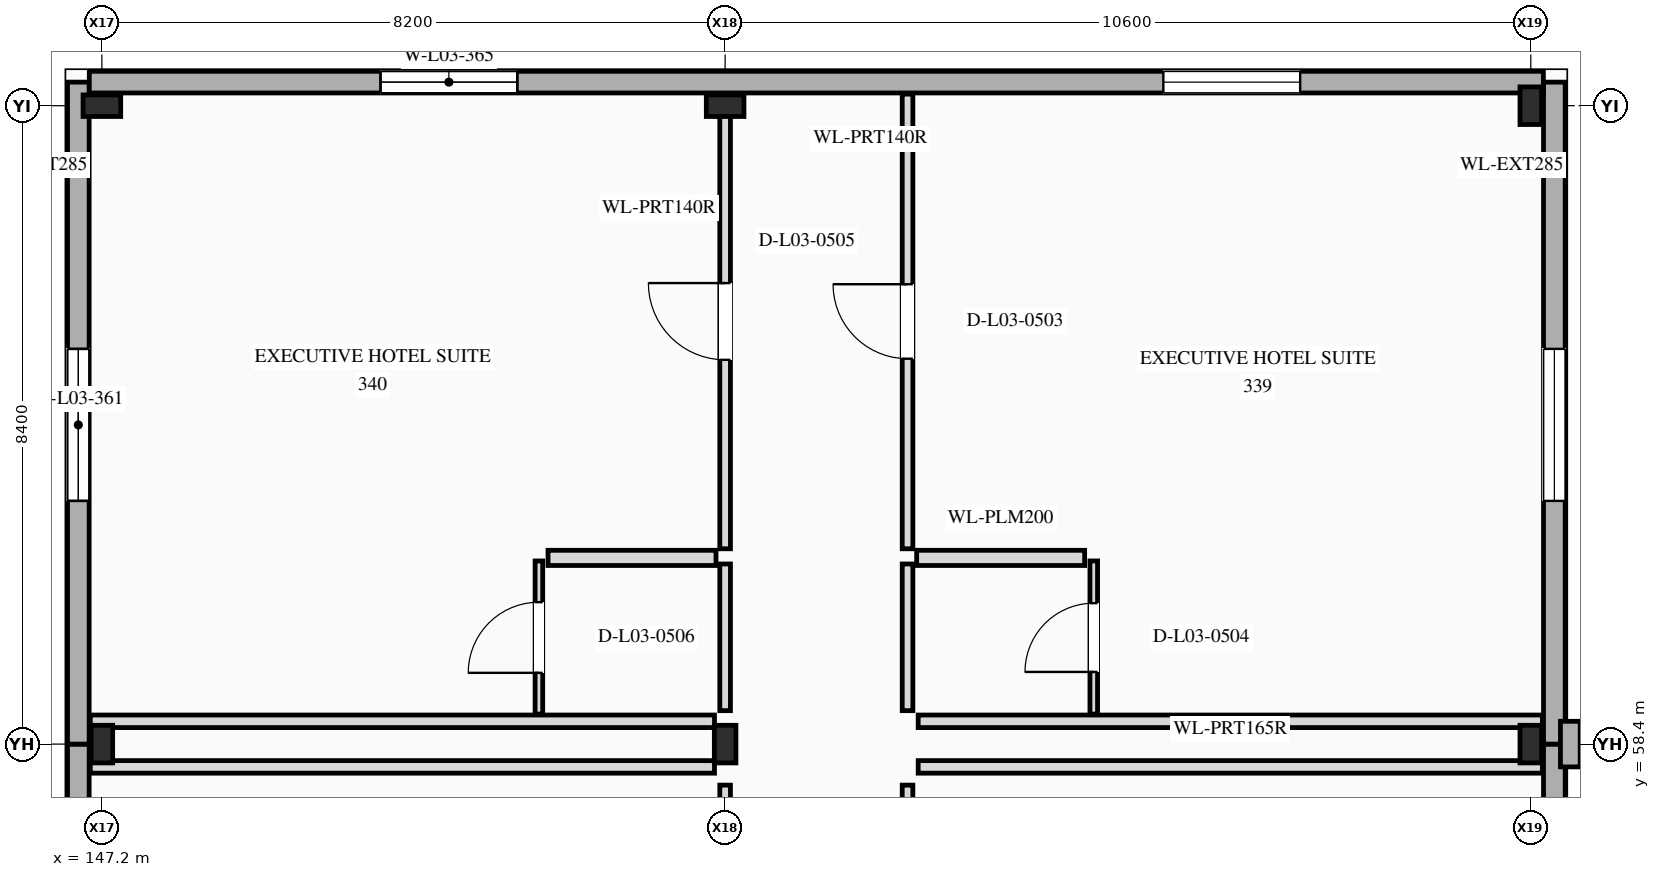
"""IFC4 building model, lengths in metres.
Left out: names, types, materials, properties, quantities, classifications, styles, units other than length and angle.
Written with IfcOpenShell. Run it as: python <this file> out.ifc"""

import sys

from ifc_helpers import new_model, si_unit, direction, frame, frame_2d, origin, origin_2d, place, context, subcontext, project, spatial, rectangle, i_section, extrude, element, fill, save


model = new_model("IFC4")
c1 = context("Model", 3, precision=1e-05, world=origin(), true_north=direction((0.0, 1.0)))
c2 = subcontext(c1, "Body", "Model", "MODEL_VIEW")
j1 = project(units=[si_unit("LENGTHUNIT", "METRE"), si_unit("PLANEANGLEUNIT", "RADIAN")], contexts=[c1])
p1 = place(None, origin())
s1 = spatial("IfcSite", under=j1, at=p1, CompositionType="ELEMENT")
p2 = place(p1, origin())
s2 = spatial("IfcBuilding", under=s1, at=p2, CompositionType="ELEMENT")
p3 = place(p2, frame((0.0, 0.0, 15.6)))
s3 = spatial("IfcBuildingStorey", under=s2, at=p3, CompositionType="ELEMENT", Elevation=15.6)
for number, where, z_axis, x_axis in (
    (1, (147.2, 58.4, 0.0), (0.0, 0.0, 1.0), (1.0, 0.0, 0.0)),
    (2, (147.2, 66.8, 0.0), (0.0, 0.0, 1.0), (0.0, 1.0, 0.0)),
    (3, (155.4, 58.4, 0.0), (0.0, 0.0, 1.0), (1.0, 0.0, 0.0)),
    (4, (155.4, 66.8, 0.0), (0.0, 0.0, 1.0), (0.0, 1.0, 0.0)),
    (5, (166.0, 58.4, 0.0), (0.0, 0.0, 1.0), (1.0, 0.0, 0.0)),
    (6, (166.0, 66.8, 0.0), (0.0, 0.0, 1.0), (1.0, 0.0, 0.0)),
):
    element("IfcColumn", number, at=place(p3, frame(where, z_axis=z_axis, x_axis=x_axis)), inside=s3, PredefinedType="COLUMN", context=c2, shape_type="SweptSolid", body=[
        extrude(i_section(OverallWidth=0.284, OverallDepth=0.495, WebThickness=0.019, FlangeThickness=0.033, at=origin_2d()), origin(), (0.0, 0.0, 1.0), 3.9),
    ])
p4 = place(p3, frame((166.31, 50.0, 0.0), z_axis=(0.0, 0.0, 1.0), x_axis=(0.0, 1.0, 0.0)))
e7 = element("IfcWall", 7, at=p4, inside=s3, PredefinedType="STANDARD", context=c2, shape_type="SweptSolid", body=[
    extrude(rectangle(XDim=8.4, YDim=0.285, at=frame_2d((4.2, 0.0))), origin(), (0.0, 0.0, 1.0), 3.9),
])
p5 = place(p4, frame((3.2, 0.0, 0.85)))
e8 = element("IfcOpeningElement", 8, at=p5, cuts=e7, PredefinedType="OPENING", context=c2, shape_type="SweptSolid", body=[
    extrude(rectangle(XDim=2.0, YDim=1.65, at=frame_2d((1.0, 0.825))), frame((0.0, 0.152, 0.0), z_axis=(0.0, -1.0, 0.0), x_axis=(1.0, 0.0, 0.0)), (0.0, 0.0, 1.0), 0.305),
])
p6 = place(p3, frame((166.31, 58.4, 0.0), z_axis=(0.0, 0.0, 1.0), x_axis=(0.0, 1.0, 0.0)))
e9 = element("IfcWall", 9, at=p6, inside=s3, PredefinedType="STANDARD", context=c2, shape_type="SweptSolid", body=[
    extrude(rectangle(XDim=8.71, YDim=0.285, at=frame_2d((4.355, 0.0))), origin(), (0.0, 0.0, 1.0), 3.9),
])
p7 = place(p6, frame((3.2, 0.0, 0.85)))
e10 = element("IfcOpeningElement", 10, at=p7, cuts=e9, PredefinedType="OPENING", context=c2, shape_type="SweptSolid", body=[
    extrude(rectangle(XDim=2.0, YDim=1.65, at=frame_2d((1.0, 0.825))), frame((0.0, 0.152, 0.0), z_axis=(0.0, -1.0, 0.0), x_axis=(1.0, 0.0, 0.0)), (0.0, 0.0, 1.0), 0.305),
])
p8 = place(p3, frame((166.52, 58.1, 0.0), z_axis=(0.0, 0.0, 1.0), x_axis=(0.0, 1.0, 0.0)))
e11 = element("IfcWall", 11, at=p8, inside=s3, PredefinedType="ELEMENTEDWALL", context=c2, shape_type="SweptSolid", body=[
    extrude(rectangle(XDim=0.6, YDim=0.26, at=frame_2d((0.3, 0.0))), origin(), (0.0, 0.0, 1.0), 3.9),
])
p9 = place(p3, frame((146.89, 50.0, 0.0), z_axis=(0.0, 0.0, 1.0), x_axis=(0.0, 1.0, 0.0)))
e12 = element("IfcWall", 12, at=p9, inside=s3, PredefinedType="STANDARD", context=c2, shape_type="SweptSolid", body=[
    extrude(rectangle(XDim=8.4, YDim=0.285, at=frame_2d((4.2, 0.0))), origin(), (0.0, 0.0, 1.0), 3.9),
])
p10 = place(p9, frame((3.225, 0.0, 0.85)))
e13 = element("IfcOpeningElement", 13, at=p10, cuts=e12, PredefinedType="OPENING", context=c2, shape_type="SweptSolid", body=[
    extrude(rectangle(XDim=1.95, YDim=1.85, at=frame_2d((0.975, 0.925))), frame((0.0, 0.152, 0.0), z_axis=(0.0, -1.0, 0.0), x_axis=(1.0, 0.0, 0.0)), (0.0, 0.0, 1.0), 0.305),
])
p11 = place(p3, frame((146.89, 58.4, 0.0), z_axis=(0.0, 0.0, 1.0), x_axis=(0.0, 1.0, 0.0)))
e14 = element("IfcWall", 14, at=p11, inside=s3, PredefinedType="STANDARD", context=c2, shape_type="SweptSolid", body=[
    extrude(rectangle(XDim=8.71, YDim=0.285, at=frame_2d((4.355, 0.0))), origin(), (0.0, 0.0, 1.0), 3.9),
])
p12 = place(p11, frame((3.2, 0.0, 0.85)))
e15 = element("IfcOpeningElement", 15, at=p12, cuts=e14, PredefinedType="OPENING", context=c2, shape_type="SweptSolid", body=[
    extrude(rectangle(XDim=2.0, YDim=1.65, at=frame_2d((1.0, 0.825))), frame((0.0, 0.152, 0.0), z_axis=(0.0, -1.0, 0.0), x_axis=(1.0, 0.0, 0.0)), (0.0, 0.0, 1.0), 0.305),
])
p13 = place(p3, frame((166.166, 67.11, 0.0), z_axis=(0.0, 0.0, 1.0), x_axis=(-1.0, 0.0, 0.0)))
e16 = element("IfcWall", 16, at=p13, inside=s3, PredefinedType="STANDARD", context=c2, shape_type="SweptSolid", body=[
    extrude(rectangle(XDim=19.131, YDim=0.285, at=frame_2d((9.565, 0.0))), origin(), (0.0, 0.0, 1.0), 3.9),
])
p14 = place(p13, frame((3.2, 0.0, 0.88)))
e17 = element("IfcOpeningElement", 17, at=p14, cuts=e16, PredefinedType="OPENING", context=c2, shape_type="SweptSolid", body=[
    extrude(rectangle(XDim=1.8, YDim=1.8, at=frame_2d((0.9, 0.9))), frame((0.0, 0.152, 0.0), z_axis=(0.0, -1.0, 0.0), x_axis=(1.0, 0.0, 0.0)), (0.0, 0.0, 1.0), 0.305),
])
p15 = place(p13, frame((13.5, 0.0, 0.88)))
e18 = element("IfcOpeningElement", 18, at=p15, cuts=e16, PredefinedType="OPENING", context=c2, shape_type="SweptSolid", body=[
    extrude(rectangle(XDim=1.8, YDim=1.8, at=frame_2d((0.9, 0.9))), frame((0.0, 0.152, 0.0), z_axis=(0.0, -1.0, 0.0), x_axis=(1.0, 0.0, 0.0)), (0.0, 0.0, 1.0), 0.305),
])
p16 = place(p3, frame((157.8, 52.57, 0.0), z_axis=(0.0, 0.0, 1.0), x_axis=(0.0, 1.0, 0.0)))
e19 = element("IfcWall", 19, at=p16, inside=s3, PredefinedType="PARTITIONING", context=c2, shape_type="SweptSolid", body=[
    extrude(rectangle(XDim=5.29, YDim=0.14, at=frame_2d((2.645, 0.0))), origin(), (0.0, 0.0, 1.0), 3.153),
])
p17 = place(p16, frame((2.185, 0.0, 0.0)))
e20 = element("IfcOpeningElement", 20, at=p17, cuts=e19, PredefinedType="OPENING", context=c2, shape_type="SweptSolid", body=[
    extrude(rectangle(XDim=0.92, YDim=2.3, at=frame_2d((0.46, 1.15))), frame((0.0, 0.08, 0.0), z_axis=(0.0, -1.0, 0.0), x_axis=(1.0, 0.0, 0.0)), (0.0, 0.0, 1.0), 0.16),
])
p18 = place(p3, frame((157.94, 58.1, 0.0), z_axis=(0.0, 0.0, 1.0), x_axis=(1.0, 0.0, 0.0)))
e21 = element("IfcWall", 21, at=p18, inside=s3, PredefinedType="PARTITIONING", context=c2, shape_type="SweptSolid", body=[
    extrude(rectangle(XDim=8.213, YDim=0.165, at=frame_2d((4.106, 0.0))), origin(), (0.0, 0.0, 1.0), 2.99),
])
p19 = place(p3, frame((155.4, 52.57, 0.0), z_axis=(0.0, 0.0, 1.0), x_axis=(0.0, 1.0, 0.0)))
e22 = element("IfcWall", 22, at=p19, inside=s3, PredefinedType="PARTITIONING", context=c2, shape_type="SweptSolid", body=[
    extrude(rectangle(XDim=5.29, YDim=0.14, at=frame_2d((2.645, 0.0))), origin(), (0.0, 0.0, 1.0), 2.99),
])
p20 = place(p19, frame((2.17, 0.0, 0.0)))
e23 = element("IfcOpeningElement", 23, at=p20, cuts=e22, PredefinedType="OPENING", context=c2, shape_type="SweptSolid", body=[
    extrude(rectangle(XDim=0.95, YDim=2.3, at=frame_2d((0.475, 1.15))), frame((0.0, 0.08, 0.0), z_axis=(0.0, -1.0, 0.0), x_axis=(1.0, 0.0, 0.0)), (0.0, 0.0, 1.0), 0.16),
])
p21 = place(p3, frame((147.048, 58.1, 0.0), z_axis=(0.0, 0.0, 1.0), x_axis=(1.0, 0.0, 0.0)))
e24 = element("IfcWall", 24, at=p21, inside=s3, PredefinedType="PARTITIONING", context=c2, shape_type="SweptSolid", body=[
    extrude(rectangle(XDim=8.212, YDim=0.165, at=frame_2d((4.106, 0.0))), origin(), (0.0, 0.0, 1.0), 3.013),
])
p22 = place(p3, frame((157.8, 58.84, 0.0), z_axis=(0.0, 0.0, 1.0), x_axis=(0.0, 1.0, 0.0)))
e25 = element("IfcWall", 25, at=p22, inside=s3, PredefinedType="PARTITIONING", context=c2, shape_type="SweptSolid", body=[
    extrude(rectangle(XDim=1.93, YDim=0.14, at=frame_2d((0.965, 0.0))), origin(), (0.0, 0.0, 1.0), 3.158),
])
p23 = place(p3, frame((157.8, 60.97, 0.0), z_axis=(0.0, 0.0, 1.0), x_axis=(0.0, 1.0, 0.0)))
e26 = element("IfcWall", 26, at=p23, inside=s3, PredefinedType="PARTITIONING", context=c2, shape_type="SweptSolid", body=[
    extrude(rectangle(XDim=5.982, YDim=0.14, at=frame_2d((2.991, 0.0))), origin(), (0.0, 0.0, 1.0), 3.013),
])
p24 = place(p23, frame((2.501, 0.0, 0.0)))
e27 = element("IfcOpeningElement", 27, at=p24, cuts=e26, PredefinedType="OPENING", context=c2, shape_type="SweptSolid", body=[
    extrude(rectangle(XDim=0.98, YDim=2.35, at=frame_2d((0.49, 1.175))), frame((0.0, 0.08, 0.0), z_axis=(0.0, -1.0, 0.0), x_axis=(1.0, 0.0, 0.0)), (0.0, 0.0, 1.0), 0.16),
])
p25 = place(p3, frame((157.94, 58.7, 0.0), z_axis=(0.0, 0.0, 1.0), x_axis=(1.0, 0.0, 0.0)))
e28 = element("IfcWall", 28, at=p25, inside=s3, PredefinedType="PARTITIONING", context=c2, shape_type="SweptSolid", body=[
    extrude(rectangle(XDim=8.213, YDim=0.165, at=frame_2d((4.106, 0.0))), origin(), (0.0, 0.0, 1.0), 2.99),
])
p26 = place(p3, frame((157.92, 60.85, 0.0), z_axis=(0.0, 0.0, 1.0), x_axis=(1.0, 0.0, 0.0)))
e29 = element("IfcWall", 29, at=p26, inside=s3, PredefinedType="PLUMBINGWALL", context=c2, shape_type="SweptSolid", body=[
    extrude(rectangle(XDim=2.21, YDim=0.2, at=frame_2d((1.105, 0.0))), origin(), (0.0, 0.0, 1.0), 3.6),
])
p27 = place(p3, frame((160.25, 58.794, 0.0), z_axis=(0.0, 0.0, 1.0), x_axis=(0.0, 1.0, 0.0)))
e30 = element("IfcWall", 30, at=p27, inside=s3, PredefinedType="PARTITIONING", context=c2, shape_type="SweptSolid", body=[
    extrude(rectangle(XDim=2.016, YDim=0.1, at=frame_2d((1.008, 0.0))), origin(), (0.0, 0.0, 1.0), 3.158),
])
p28 = place(p27, frame((0.555, 0.0, 0.0)))
e31 = element("IfcOpeningElement", 31, at=p28, cuts=e30, PredefinedType="OPENING", context=c2, shape_type="SweptSolid", body=[
    extrude(rectangle(XDim=0.905, YDim=2.1, at=frame_2d((0.453, 1.05))), frame((0.0, 0.06, 0.0), z_axis=(0.0, -1.0, 0.0), x_axis=(1.0, 0.0, 0.0)), (0.0, 0.0, 1.0), 0.12),
])
p29 = place(p3, frame((155.4, 58.84, 0.0), z_axis=(0.0, 0.0, 1.0), x_axis=(0.0, 1.0, 0.0)))
e32 = element("IfcWall", 32, at=p29, inside=s3, PredefinedType="PARTITIONING", context=c2, shape_type="SweptSolid", body=[
    extrude(rectangle(XDim=1.93, YDim=0.14, at=frame_2d((0.965, 0.0))), origin(), (0.0, 0.0, 1.0), 3.074),
])
p30 = place(p3, frame((155.4, 60.97, 0.0), z_axis=(0.0, 0.0, 1.0), x_axis=(0.0, 1.0, 0.0)))
e33 = element("IfcWall", 33, at=p30, inside=s3, PredefinedType="PARTITIONING", context=c2, shape_type="SweptSolid", body=[
    extrude(rectangle(XDim=5.982, YDim=0.14, at=frame_2d((2.991, 0.0))), origin(), (0.0, 0.0, 1.0), 3.013),
])
p31 = place(p30, frame((2.486, 0.0, 0.0)))
e34 = element("IfcOpeningElement", 34, at=p31, cuts=e33, PredefinedType="OPENING", context=c2, shape_type="SweptSolid", body=[
    extrude(rectangle(XDim=1.01, YDim=2.35, at=frame_2d((0.505, 1.175))), frame((0.0, 0.08, 0.0), z_axis=(0.0, -1.0, 0.0), x_axis=(1.0, 0.0, 0.0)), (0.0, 0.0, 1.0), 0.16),
])
p32 = place(p3, frame((147.048, 58.7, 0.0), z_axis=(0.0, 0.0, 1.0), x_axis=(1.0, 0.0, 0.0)))
e35 = element("IfcWall", 35, at=p32, inside=s3, PredefinedType="PARTITIONING", context=c2, shape_type="SweptSolid", body=[
    extrude(rectangle(XDim=8.212, YDim=0.165, at=frame_2d((4.106, 0.0))), origin(), (0.0, 0.0, 1.0), 3.013),
])
p33 = place(p3, frame((153.07, 60.85, 0.0), z_axis=(0.0, 0.0, 1.0), x_axis=(1.0, 0.0, 0.0)))
e36 = element("IfcWall", 36, at=p33, inside=s3, PredefinedType="PLUMBINGWALL", context=c2, shape_type="SweptSolid", body=[
    extrude(rectangle(XDim=2.21, YDim=0.2, at=frame_2d((1.105, 0.0))), origin(), (0.0, 0.0, 1.0), 3.6),
])
p34 = place(p3, frame((152.95, 58.794, 0.0), z_axis=(0.0, 0.0, 1.0), x_axis=(0.0, 1.0, 0.0)))
e37 = element("IfcWall", 37, at=p34, inside=s3, PredefinedType="PARTITIONING", context=c2, shape_type="SweptSolid", body=[
    extrude(rectangle(XDim=2.016, YDim=0.1, at=frame_2d((1.008, 0.0))), origin(), (0.0, 0.0, 1.0), 3.208),
])
p35 = place(p34, frame((0.543, 0.0, 0.0)))
e38 = element("IfcOpeningElement", 38, at=p35, cuts=e37, PredefinedType="OPENING", context=c2, shape_type="SweptSolid", body=[
    extrude(rectangle(XDim=0.93, YDim=2.14, at=frame_2d((0.465, 1.07))), frame((0.0, 0.06, 0.0), z_axis=(0.0, -1.0, 0.0), x_axis=(1.0, 0.0, 0.0)), (0.0, 0.0, 1.0), 0.12),
])
p36 = place(p7, origin())
e39 = element("IfcWindow", 39, at=p36, inside=s3, PartitioningType="SINGLE_PANEL", PredefinedType="WINDOW", context=c2, shape_type="SweptSolid", body=[
    extrude(rectangle(XDim=2.0, YDim=1.65, at=frame_2d((1.0, 0.825))), frame((0.0, 0.03, 0.0), z_axis=(0.0, -1.0, 0.0), x_axis=(1.0, 0.0, 0.0)), (0.0, 0.0, 1.0), 0.06),
])
fill(e10, e39)
p37 = place(p12, origin())
e40 = element("IfcWindow", 40, at=p37, inside=s3, PartitioningType="SINGLE_PANEL", PredefinedType="WINDOW", context=c2, shape_type="SweptSolid", body=[
    extrude(rectangle(XDim=2.0, YDim=1.65, at=frame_2d((1.0, 0.825))), frame((0.0, 0.03, 0.0), z_axis=(0.0, -1.0, 0.0), x_axis=(1.0, 0.0, 0.0)), (0.0, 0.0, 1.0), 0.06),
])
fill(e15, e40)
p38 = place(p14, origin())
e41 = element("IfcWindow", 41, at=p38, inside=s3, PartitioningType="SINGLE_PANEL", PredefinedType="WINDOW", context=c2, shape_type="SweptSolid", body=[
    extrude(rectangle(XDim=1.8, YDim=1.8, at=frame_2d((0.9, 0.9))), frame((0.0, 0.03, 0.0), z_axis=(0.0, -1.0, 0.0), x_axis=(1.0, 0.0, 0.0)), (0.0, 0.0, 1.0), 0.06),
])
fill(e17, e41)
p39 = place(p15, origin())
e42 = element("IfcWindow", 42, at=p39, inside=s3, PartitioningType="SINGLE_PANEL", PredefinedType="WINDOW", context=c2, shape_type="SweptSolid", body=[
    extrude(rectangle(XDim=1.8, YDim=1.8, at=frame_2d((0.9, 0.9))), frame((0.0, 0.03, 0.0), z_axis=(0.0, -1.0, 0.0), x_axis=(1.0, 0.0, 0.0)), (0.0, 0.0, 1.0), 0.06),
])
fill(e18, e42)
p40 = place(p24, origin())
e43 = element("IfcDoor", 43, at=p40, inside=s3, OperationType="SINGLE_SWING_RIGHT", PredefinedType="DOOR", context=c2, shape_type="SweptSolid", body=[
    extrude(rectangle(XDim=0.98, YDim=2.35, at=frame_2d((0.49, 1.175))), frame((0.0, 0.025, 0.0), z_axis=(0.0, -1.0, 0.0), x_axis=(1.0, 0.0, 0.0)), (0.0, 0.0, 1.0), 0.05),
])
fill(e27, e43)
p41 = place(p28, origin())
e44 = element("IfcDoor", 44, at=p41, inside=s3, OperationType="SINGLE_SWING_LEFT", PredefinedType="DOOR", context=c2, shape_type="SweptSolid", body=[
    extrude(rectangle(XDim=0.905, YDim=2.1, at=frame_2d((0.453, 1.05))), frame((0.0, 0.025, 0.0), z_axis=(0.0, -1.0, 0.0), x_axis=(1.0, 0.0, 0.0)), (0.0, 0.0, 1.0), 0.05),
])
fill(e31, e44)
p42 = place(p31, origin())
e45 = element("IfcDoor", 45, at=p42, inside=s3, OperationType="SINGLE_SWING_RIGHT", PredefinedType="DOOR", context=c2, shape_type="SweptSolid", body=[
    extrude(rectangle(XDim=1.01, YDim=2.35, at=frame_2d((0.505, 1.175))), frame((0.0, 0.025, 0.0), z_axis=(0.0, -1.0, 0.0), x_axis=(1.0, 0.0, 0.0)), (0.0, 0.0, 1.0), 0.05),
])
fill(e34, e45)
p43 = place(p35, origin())
e46 = element("IfcDoor", 46, at=p43, inside=s3, OperationType="SINGLE_SWING_LEFT", PredefinedType="DOOR", context=c2, shape_type="SweptSolid", body=[
    extrude(rectangle(XDim=0.93, YDim=2.14, at=frame_2d((0.465, 1.07))), frame((0.0, 0.025, 0.0), z_axis=(0.0, -1.0, 0.0), x_axis=(1.0, 0.0, 0.0)), (0.0, 0.0, 1.0), 0.05),
])
fill(e38, e46)
save(model, sys.argv[1])
